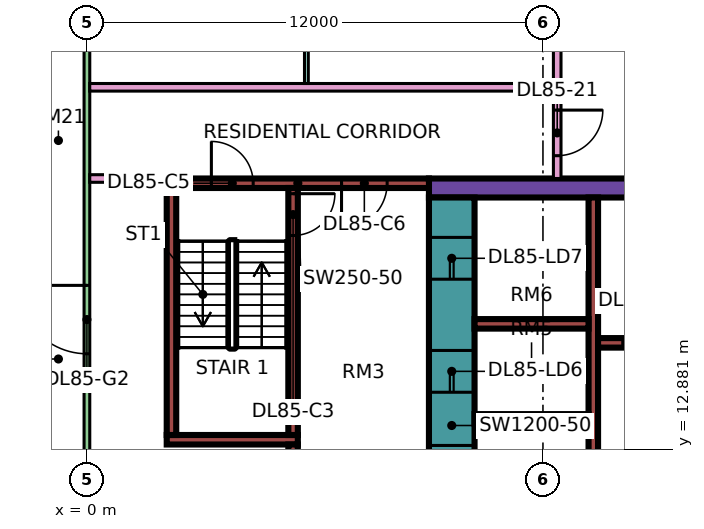
"""IFC4 building model, lengths in metres.
Left out: names, types, materials, properties, quantities, classifications, styles, units other than length and angle.
Written with IfcOpenShell. Run it as: python <this file> out.ifc"""

import sys

from ifc_helpers import new_model, si_unit, direction, frame, frame_2d, origin, place, context, subcontext, project, spatial, rectangle, extrude, element, fill, save


model = new_model("IFC4")
c1 = context("Model", 3, precision=1e-05, world=origin(), true_north=direction((0.0, 1.0)))
c2 = subcontext(c1, "Body", "Model", "MODEL_VIEW")
j1 = project(units=[si_unit("LENGTHUNIT", "METRE"), si_unit("PLANEANGLEUNIT", "RADIAN")], contexts=[c1])
p1 = place(None, origin())
s1 = spatial("IfcSite", under=j1, at=p1, CompositionType="ELEMENT")
p2 = place(p1, origin())
s2 = spatial("IfcBuilding", under=s1, at=p2, CompositionType="ELEMENT")
p3 = place(p2, frame((0.0, 0.0, 365.15)))
s3 = spatial("IfcBuildingStorey", under=s2, at=p3, CompositionType="ELEMENT", Elevation=365.15)
p4 = place(p3, frame((9.0, 19.75, 0.0), z_axis=(0.0, 0.0, 1.0), x_axis=(1.0, 0.0, 0.0)))
e1 = element("IfcWall", 1, at=p4, inside=s3, PredefinedType="SHEAR", context=c2, shape_type="SweptSolid", body=[
    extrude(rectangle(XDim=25.0, YDim=0.5, at=frame_2d((12.5, 0.0))), origin(), (0.0, 0.0, 1.0), 3.75),
])
p5 = place(p4, frame((19.1, 0.0, 0.0)))
e2 = element("IfcOpeningElement", 2, at=p5, cuts=e1, PredefinedType="OPENING", context=c2, shape_type="SweptSolid", body=[
    extrude(rectangle(XDim=1.8, YDim=2.4, at=frame_2d((0.9, 1.2))), frame((0.0, 0.26, 0.0), z_axis=(0.0, -1.0, 0.0), x_axis=(1.0, 0.0, 0.0)), (0.0, 0.0, 1.0), 0.52),
])
p6 = place(p3, frame((9.6, 7.5, 0.0), z_axis=(0.0, 0.0, 1.0), x_axis=(0.0, 1.0, 0.0)))
e3 = element("IfcWall", 3, at=p6, inside=s3, PredefinedType="SHEAR", context=c2, shape_type="SweptSolid", body=[
    extrude(rectangle(XDim=12.0, YDim=1.2, at=frame_2d((6.0, 0.0))), origin(), (0.0, 0.0, 1.0), 3.75),
])
p7 = place(p6, frame((4.375, 0.0, 0.0)))
e4 = element("IfcOpeningElement", 4, at=p7, cuts=e3, PredefinedType="OPENING", context=c2, shape_type="SweptSolid", body=[
    extrude(rectangle(XDim=1.1, YDim=2.2, at=frame_2d((0.55, 1.1))), frame((0.0, 0.61, 0.0), z_axis=(0.0, -1.0, 0.0), x_axis=(1.0, 0.0, 0.0)), (0.0, 0.0, 1.0), 1.22),
])
p8 = place(p6, frame((6.875, 0.0, 0.0)))
e5 = element("IfcOpeningElement", 5, at=p8, cuts=e3, PredefinedType="OPENING", context=c2, shape_type="SweptSolid", body=[
    extrude(rectangle(XDim=1.1, YDim=2.2, at=frame_2d((0.55, 1.1))), frame((0.0, 0.61, 0.0), z_axis=(0.0, -1.0, 0.0), x_axis=(1.0, 0.0, 0.0)), (0.0, 0.0, 1.0), 1.22),
])
p9 = place(p6, frame((9.85, 0.0, 0.0)))
e6 = element("IfcOpeningElement", 6, at=p9, cuts=e3, PredefinedType="OPENING", context=c2, shape_type="SweptSolid", body=[
    extrude(rectangle(XDim=1.1, YDim=2.2, at=frame_2d((0.55, 1.1))), frame((0.0, 0.61, 0.0), z_axis=(0.0, -1.0, 0.0), x_axis=(1.0, 0.0, 0.0)), (0.0, 0.0, 1.0), 1.22),
])
p10 = place(p6, frame((2.05, 0.0, 0.0)))
e7 = element("IfcOpeningElement", 7, at=p10, cuts=e3, PredefinedType="OPENING", context=c2, shape_type="SweptSolid", body=[
    extrude(rectangle(XDim=0.9, YDim=2.1, at=frame_2d((0.45, 1.05))), frame((0.0, 0.61, 0.0), z_axis=(0.0, -1.0, 0.0), x_axis=(1.0, 0.0, 0.0)), (0.0, 0.0, 1.0), 1.22),
])
p11 = place(p3, frame((13.325, 7.5, 0.0), z_axis=(0.0, 0.0, 1.0), x_axis=(0.0, 1.0, 0.0)))
e8 = element("IfcWall", 8, at=p11, inside=s3, PredefinedType="SHEAR", context=c2, shape_type="SweptSolid", body=[
    extrude(rectangle(XDim=12.0, YDim=0.25, at=frame_2d((6.0, 0.0))), origin(), (0.0, 0.0, 1.0), 3.75),
])
p12 = place(p3, frame((13.45, 15.675, 0.0), z_axis=(0.0, 0.0, 1.0), x_axis=(1.0, 0.0, 0.0)))
e9 = element("IfcWall", 9, at=p12, inside=s3, PredefinedType="SHEAR", context=c2, shape_type="SweptSolid", body=[
    extrude(rectangle(XDim=13.75, YDim=0.25, at=frame_2d((6.875, 0.0))), origin(), (0.0, 0.0, 1.0), 3.75),
])
p13 = place(p12, frame((0.65, 0.0, 0.0)))
e10 = element("IfcOpeningElement", 10, at=p13, cuts=e9, PredefinedType="OPENING", context=c2, shape_type="SweptSolid", body=[
    extrude(rectangle(XDim=1.2, YDim=2.2, at=frame_2d((0.6, 1.1))), frame((0.0, 0.135, 0.0), z_axis=(0.0, -1.0, 0.0), x_axis=(1.0, 0.0, 0.0)), (0.0, 0.0, 1.0), 0.27),
])
p14 = place(p12, frame((3.4, 0.0, 0.0)))
e11 = element("IfcOpeningElement", 11, at=p14, cuts=e9, PredefinedType="OPENING", context=c2, shape_type="SweptSolid", body=[
    extrude(rectangle(XDim=1.2, YDim=2.2, at=frame_2d((0.6, 1.1))), frame((0.0, 0.135, 0.0), z_axis=(0.0, -1.0, 0.0), x_axis=(1.0, 0.0, 0.0)), (0.0, 0.0, 1.0), 0.27),
])
p15 = place(p12, frame((6.15, 0.0, 0.0)))
e12 = element("IfcOpeningElement", 12, at=p15, cuts=e9, PredefinedType="OPENING", context=c2, shape_type="SweptSolid", body=[
    extrude(rectangle(XDim=1.2, YDim=2.2, at=frame_2d((0.6, 1.1))), frame((0.0, 0.135, 0.0), z_axis=(0.0, -1.0, 0.0), x_axis=(1.0, 0.0, 0.0)), (0.0, 0.0, 1.0), 0.27),
])
p16 = place(p12, frame((8.9, 0.0, 0.0)))
e13 = element("IfcOpeningElement", 13, at=p16, cuts=e9, PredefinedType="OPENING", context=c2, shape_type="SweptSolid", body=[
    extrude(rectangle(XDim=1.2, YDim=2.2, at=frame_2d((0.6, 1.1))), frame((0.0, 0.135, 0.0), z_axis=(0.0, -1.0, 0.0), x_axis=(1.0, 0.0, 0.0)), (0.0, 0.0, 1.0), 0.27),
])
p17 = place(p12, frame((11.8, 0.0, 0.0)))
e14 = element("IfcOpeningElement", 14, at=p17, cuts=e9, PredefinedType="OPENING", context=c2, shape_type="SweptSolid", body=[
    extrude(rectangle(XDim=0.9, YDim=2.1, at=frame_2d((0.45, 1.05))), frame((0.0, 0.135, 0.0), z_axis=(0.0, -1.0, 0.0), x_axis=(1.0, 0.0, 0.0)), (0.0, 0.0, 1.0), 0.27),
])
for number, where, z_axis, x_axis in (
    (15, (10.2, 13.675, 0.0), (0.0, 0.0, 1.0), (1.0, 0.0, 0.0)),
    (16, (10.2, 16.175, 0.0), (0.0, 0.0, 1.0), (1.0, 0.0, 0.0)),
):
    element("IfcWall", number, at=place(p3, frame(where, z_axis=z_axis, x_axis=x_axis)), inside=s3, PredefinedType="SHEAR", context=c2, shape_type="SweptSolid", body=[
        extrude(rectangle(XDim=3.0, YDim=0.25, at=frame_2d((1.5, 0.0))), origin(), (0.0, 0.0, 1.0), 3.75),
    ])
p18 = place(p3, frame((2.1, 19.875, 0.0), z_axis=(0.0, 0.0, 1.0), x_axis=(1.0, 0.0, 0.0)))
e17 = element("IfcWall", 17, at=p18, inside=s3, PredefinedType="SHEAR", context=c2, shape_type="SweptSolid", body=[
    extrude(rectangle(XDim=6.9, YDim=0.25, at=frame_2d((3.45, 0.0))), origin(), (0.0, 0.0, 1.0), 3.75),
])
p19 = place(p18, frame((1.175, 0.0, 0.0)))
e18 = element("IfcOpeningElement", 18, at=p19, cuts=e17, PredefinedType="OPENING", context=c2, shape_type="SweptSolid", body=[
    extrude(rectangle(XDim=1.1, YDim=2.2, at=frame_2d((0.55, 1.1))), frame((0.0, 0.135, 0.0), z_axis=(0.0, -1.0, 0.0), x_axis=(1.0, 0.0, 0.0)), (0.0, 0.0, 1.0), 0.27),
])
p20 = place(p18, frame((4.6, 0.0, 0.0)))
e19 = element("IfcOpeningElement", 19, at=p20, cuts=e17, PredefinedType="OPENING", context=c2, shape_type="SweptSolid", body=[
    extrude(rectangle(XDim=1.2, YDim=2.2, at=frame_2d((0.6, 1.1))), frame((0.0, 0.135, 0.0), z_axis=(0.0, -1.0, 0.0), x_axis=(1.0, 0.0, 0.0)), (0.0, 0.0, 1.0), 0.27),
])
p21 = place(p3, frame((2.1, 13.125, 0.0), z_axis=(0.0, 0.0, 1.0), x_axis=(1.0, 0.0, 0.0)))
e20 = element("IfcWall", 20, at=p21, inside=s3, PredefinedType="SHEAR", context=c2, shape_type="SweptSolid", body=[
    extrude(rectangle(XDim=3.45, YDim=0.25, at=frame_2d((1.725, 0.0))), origin(), (0.0, 0.0, 1.0), 3.75),
])
p22 = place(p3, frame((2.225, 13.25, 0.0), z_axis=(0.0, 0.0, 1.0), x_axis=(0.0, 1.0, 0.0)))
e21 = element("IfcWall", 21, at=p22, inside=s3, PredefinedType="SHEAR", context=c2, shape_type="SweptSolid", body=[
    extrude(rectangle(XDim=6.5, YDim=0.25, at=frame_2d((3.25, 0.0))), origin(), (0.0, 0.0, 1.0), 3.75),
])
p23 = place(p3, frame((5.425, 13.25, 0.0), z_axis=(0.0, 0.0, 1.0), x_axis=(0.0, 1.0, 0.0)))
e22 = element("IfcWall", 22, at=p23, inside=s3, PredefinedType="SHEAR", context=c2, shape_type="SweptSolid", body=[
    extrude(rectangle(XDim=6.5, YDim=0.25, at=frame_2d((3.25, 0.0))), origin(), (0.0, 0.0, 1.0), 3.75),
])
p24 = place(p23, frame((5.25, 0.0, 0.0)))
e23 = element("IfcOpeningElement", 23, at=p24, cuts=e22, PredefinedType="OPENING", context=c2, shape_type="SweptSolid", body=[
    extrude(rectangle(XDim=1.1, YDim=2.2, at=frame_2d((0.55, 1.1))), frame((0.0, 0.135, 0.0), z_axis=(0.0, -1.0, 0.0), x_axis=(1.0, 0.0, 0.0)), (0.0, 0.0, 1.0), 0.27),
])
p25 = place(p3, frame((5.425, 9.0, 0.0), z_axis=(0.0, 0.0, 1.0), x_axis=(0.0, 1.0, 0.0)))
e24 = element("IfcWall", 24, at=p25, inside=s3, PredefinedType="SHEAR", context=c2, shape_type="SweptSolid", body=[
    extrude(rectangle(XDim=4.0, YDim=0.25, at=frame_2d((2.0, 0.0))), origin(), (0.0, 0.0, 1.0), 3.75),
])
p26 = place(p3, frame((0.0, 23.925, 0.0), z_axis=(0.0, 0.0, 1.0), x_axis=(0.0, -1.0, 0.0)))
e25 = element("IfcWall", 25, at=p26, inside=s3, PredefinedType="SOLIDWALL", context=c2, shape_type="SweptSolid", body=[
    extrude(rectangle(XDim=11.35, YDim=0.15, at=frame_2d((5.675, 0.0))), origin(), (0.0, 0.0, 1.0), 3.35),
])
p27 = place(p26, frame((6.738, 0.0, 0.0)))
e26 = element("IfcOpeningElement", 26, at=p27, cuts=e25, PredefinedType="OPENING", context=c2, shape_type="SweptSolid", body=[
    extrude(rectangle(XDim=1.8, YDim=2.4, at=frame_2d((0.9, 1.2))), frame((0.0, 0.085, 0.0), z_axis=(0.0, -1.0, 0.0), x_axis=(1.0, 0.0, 0.0)), (0.0, 0.0, 1.0), 0.17),
])
p28 = place(p3, frame((0.074, 20.0, 0.0), z_axis=(0.0, 0.0, 1.0), x_axis=(1.0, 0.0, 0.0)))
e27 = element("IfcWall", 27, at=p28, inside=s3, PredefinedType="PARTITIONING", context=c2, shape_type="SweptSolid", body=[
    extrude(rectangle(XDim=2.026, YDim=0.2, at=frame_2d((1.013, 0.0))), origin(), (0.0, 0.0, 1.0), 3.35),
])
p29 = place(p3, frame((0.074, 22.4, 0.0), z_axis=(0.0, 0.0, 1.0), x_axis=(1.0, 0.0, 0.0)))
e28 = element("IfcWall", 28, at=p29, inside=s3, PredefinedType="PARTITIONING", context=c2, shape_type="SweptSolid", body=[
    extrude(rectangle(XDim=12.201, YDim=0.2, at=frame_2d((6.101, 0.0))), origin(), (0.0, 0.0, 1.0), 3.35),
])
p30 = place(p3, frame((5.775, 22.5, 0.0), z_axis=(0.0, 0.0, 1.0), x_axis=(0.0, 1.0, 0.0)))
e29 = element("IfcWall", 29, at=p30, inside=s3, PredefinedType="PARTITIONING", context=c2, shape_type="SweptSolid", body=[
    extrude(rectangle(XDim=4.45, YDim=0.1, at=frame_2d((2.225, 0.0))), origin(), (0.0, 0.0, 1.0), 3.35),
])
p31 = place(p3, frame((12.375, 20.0, 0.0), z_axis=(0.0, 0.0, 1.0), x_axis=(0.0, 1.0, 0.0)))
e30 = element("IfcWall", 30, at=p31, inside=s3, PredefinedType="PARTITIONING", context=c2, shape_type="SweptSolid", body=[
    extrude(rectangle(XDim=33.926, YDim=0.2, at=frame_2d((16.963, 0.0))), origin(), (0.0, 0.0, 1.0), 3.35),
])
p32 = place(p31, frame((29.4, 0.0, 0.0)))
e31 = element("IfcOpeningElement", 31, at=p32, cuts=e30, PredefinedType="OPENING", context=c2, shape_type="SweptSolid", body=[
    extrude(rectangle(XDim=1.0, YDim=2.1, at=frame_2d((0.5, 1.05))), frame((0.0, 0.11, 0.0), z_axis=(0.0, -1.0, 0.0), x_axis=(1.0, 0.0, 0.0)), (0.0, 0.0, 1.0), 0.22),
])
p33 = place(p31, frame((0.6, 0.0, 0.0)))
e32 = element("IfcOpeningElement", 32, at=p33, cuts=e30, PredefinedType="OPENING", context=c2, shape_type="SweptSolid", body=[
    extrude(rectangle(XDim=1.2, YDim=2.1, at=frame_2d((0.6, 1.05))), frame((0.0, 0.11, 0.0), z_axis=(0.0, -1.0, 0.0), x_axis=(1.0, 0.0, 0.0)), (0.0, 0.0, 1.0), 0.22),
])
p34 = place(p31, frame((4.5, 0.0, 0.0)))
e33 = element("IfcOpeningElement", 33, at=p34, cuts=e30, PredefinedType="OPENING", context=c2, shape_type="SweptSolid", body=[
    extrude(rectangle(XDim=1.0, YDim=2.1, at=frame_2d((0.5, 1.05))), frame((0.0, 0.11, 0.0), z_axis=(0.0, -1.0, 0.0), x_axis=(1.0, 0.0, 0.0)), (0.0, 0.0, 1.0), 0.22),
])
p35 = place(p27, frame((1.8, 0.0, 0.0), z_axis=(0.0, 0.0, 1.0), x_axis=(-1.0, 0.0, 0.0)))
e34 = element("IfcDoor", 34, at=p35, inside=s3, OperationType="DOUBLE_DOOR_SINGLE_SWING", PredefinedType="DOOR", context=c2, shape_type="SweptSolid", body=[
    extrude(rectangle(XDim=1.8, YDim=2.4, at=frame_2d((0.9, 1.2))), frame((0.0, 0.025, 0.0), z_axis=(0.0, -1.0, 0.0), x_axis=(1.0, 0.0, 0.0)), (0.0, 0.0, 1.0), 0.05),
])
fill(e26, e34)
p36 = place(p13, origin())
e35 = element("IfcDoor", 35, at=p36, inside=s3, OperationType="DOUBLE_DOOR_SLIDING", PredefinedType="DOOR", context=c2, shape_type="SweptSolid", body=[
    extrude(rectangle(XDim=1.2, YDim=2.2, at=frame_2d((0.6, 1.1))), frame((0.0, 0.025, 0.0), z_axis=(0.0, -1.0, 0.0), x_axis=(1.0, 0.0, 0.0)), (0.0, 0.0, 1.0), 0.05),
])
fill(e10, e35)
p37 = place(p7, origin())
e36 = element("IfcDoor", 36, at=p37, inside=s3, OperationType="DOUBLE_DOOR_SLIDING", PredefinedType="DOOR", context=c2, shape_type="SweptSolid", body=[
    extrude(rectangle(XDim=1.1, YDim=2.2, at=frame_2d((0.55, 1.1))), frame((0.0, 0.025, 0.0), z_axis=(0.0, -1.0, 0.0), x_axis=(1.0, 0.0, 0.0)), (0.0, 0.0, 1.0), 0.05),
])
fill(e4, e36)
p38 = place(p8, origin())
e37 = element("IfcDoor", 37, at=p38, inside=s3, OperationType="DOUBLE_DOOR_SLIDING", PredefinedType="DOOR", context=c2, shape_type="SweptSolid", body=[
    extrude(rectangle(XDim=1.1, YDim=2.2, at=frame_2d((0.55, 1.1))), frame((0.0, 0.025, 0.0), z_axis=(0.0, -1.0, 0.0), x_axis=(1.0, 0.0, 0.0)), (0.0, 0.0, 1.0), 0.05),
])
fill(e5, e37)
p39 = place(p9, origin())
e38 = element("IfcDoor", 38, at=p39, inside=s3, OperationType="DOUBLE_DOOR_SLIDING", PredefinedType="DOOR", context=c2, shape_type="SweptSolid", body=[
    extrude(rectangle(XDim=1.1, YDim=2.2, at=frame_2d((0.55, 1.1))), frame((0.0, 0.025, 0.0), z_axis=(0.0, -1.0, 0.0), x_axis=(1.0, 0.0, 0.0)), (0.0, 0.0, 1.0), 0.05),
])
fill(e6, e38)
p40 = place(p24, origin())
e39 = element("IfcDoor", 39, at=p40, inside=s3, OperationType="SINGLE_SWING_RIGHT", PredefinedType="DOOR", context=c2, shape_type="SweptSolid", body=[
    extrude(rectangle(XDim=1.1, YDim=2.2, at=frame_2d((0.55, 1.1))), frame((0.0, 0.025, 0.0), z_axis=(0.0, -1.0, 0.0), x_axis=(1.0, 0.0, 0.0)), (0.0, 0.0, 1.0), 0.05),
])
fill(e23, e39)
p41 = place(p19, origin())
e40 = element("IfcDoor", 40, at=p41, inside=s3, OperationType="SINGLE_SWING_LEFT", PredefinedType="DOOR", context=c2, shape_type="SweptSolid", body=[
    extrude(rectangle(XDim=1.1, YDim=2.2, at=frame_2d((0.55, 1.1))), frame((0.0, 0.025, 0.0), z_axis=(0.0, -1.0, 0.0), x_axis=(1.0, 0.0, 0.0)), (0.0, 0.0, 1.0), 0.05),
])
fill(e18, e40)
p42 = place(p20, frame((1.2, 0.0, 0.0), z_axis=(0.0, 0.0, 1.0), x_axis=(-1.0, 0.0, 0.0)))
e41 = element("IfcDoor", 41, at=p42, inside=s3, OperationType="SINGLE_SWING_LEFT", PredefinedType="DOOR", context=c2, shape_type="SweptSolid", body=[
    extrude(rectangle(XDim=1.2, YDim=2.2, at=frame_2d((0.6, 1.1))), frame((0.0, 0.025, 0.0), z_axis=(0.0, -1.0, 0.0), x_axis=(1.0, 0.0, 0.0)), (0.0, 0.0, 1.0), 0.05),
])
fill(e19, e41)
p43 = place(p33, origin())
e42 = element("IfcDoor", 42, at=p43, inside=s3, OperationType="SINGLE_SWING_RIGHT", PredefinedType="DOOR", context=c2, shape_type="SweptSolid", body=[
    extrude(rectangle(XDim=1.2, YDim=2.1, at=frame_2d((0.6, 1.05))), frame((0.0, 0.025, 0.0), z_axis=(0.0, -1.0, 0.0), x_axis=(1.0, 0.0, 0.0)), (0.0, 0.0, 1.0), 0.05),
])
fill(e32, e42)
save(model, sys.argv[1])
